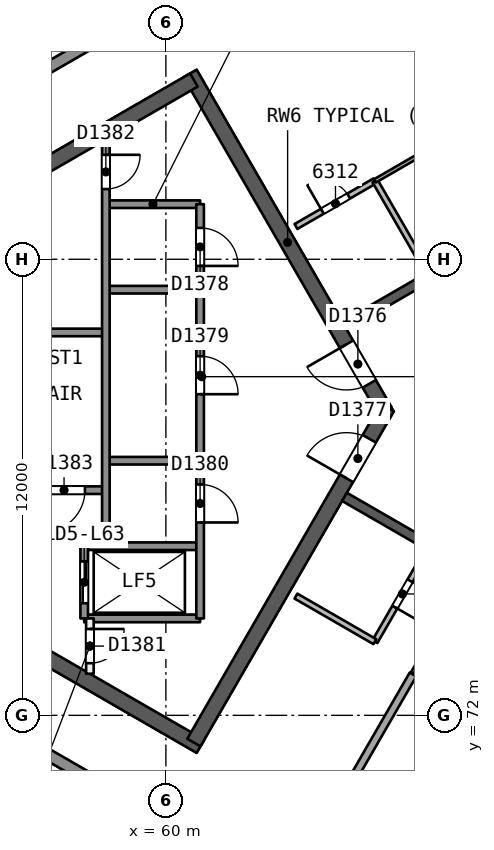
"""IFC4 building model, lengths in metres.
Left out: names, types, materials, properties, quantities, classifications, styles, units other than length and angle.
Written with IfcOpenShell. Run it as: python <this file> out.ifc"""

import sys

from ifc_helpers import new_model, si_unit, direction, frame, frame_2d, origin, place, context, subcontext, project, spatial, rectangle, extrude, element, fill, save


model = new_model("IFC4")
c1 = context("Model", 3, precision=1e-05, world=origin(), true_north=direction((0.0, 1.0)))
c2 = subcontext(c1, "Body", "Model", "MODEL_VIEW")
j1 = project(units=[si_unit("LENGTHUNIT", "METRE"), si_unit("PLANEANGLEUNIT", "RADIAN")], contexts=[c1])
p1 = place(None, origin())
s1 = spatial("IfcSite", under=j1, at=p1, CompositionType="ELEMENT")
p2 = place(p1, origin())
s2 = spatial("IfcBuilding", under=s1, at=p2, CompositionType="ELEMENT")
p3 = place(p2, frame((0.0, 0.0, 259.0)))
s3 = spatial("IfcBuildingStorey", under=s2, at=p3, CompositionType="ELEMENT", Elevation=259.0)
p4 = place(p3, frame((65.769, 80.0, 0.0), z_axis=(0.0, 0.0, 1.0), x_axis=(-0.50000177223, 0.866024380585, 0.0)))
e1 = element("IfcWall", 1, at=p4, inside=s3, PredefinedType="SHEAR", context=c2, shape_type="SweptSolid", body=[
    extrude(rectangle(XDim=10.265, YDim=0.4, at=frame_2d((5.132, 0.0))), origin(), (0.0, 0.0, 1.0), 3.7),
])
p5 = place(p4, frame((0.834, 0.0, 0.0)))
e2 = element("IfcOpeningElement", 2, at=p5, cuts=e1, PredefinedType="OPENING", context=c2, shape_type="SweptSolid", body=[
    extrude(rectangle(XDim=1.2, YDim=2.1, at=frame_2d((0.6, 1.05))), frame((0.0, 0.21, 0.0), z_axis=(0.0, -1.0, 0.0), x_axis=(1.0, 0.0, 0.0)), (0.0, 0.0, 1.0), 0.421),
])
p6 = place(p3, frame((60.737, 88.716, 0.0), z_axis=(0.0, 0.0, 1.0), x_axis=(-0.866028812667, -0.499994095595, 0.0)))
e3 = element("IfcWall", 3, at=p6, inside=s3, PredefinedType="SHEAR", context=c2, shape_type="SweptSolid", body=[
    extrude(rectangle(XDim=14.134, YDim=0.4, at=frame_2d((7.067, 0.0))), origin(), (0.0, 0.0, 1.0), 3.7),
])
p7 = place(p3, frame((48.597, 78.293, 0.0), z_axis=(0.0, 0.0, 1.0), x_axis=(0.866026024469, -0.499998924941, 0.0)))
e4 = element("IfcWall", 4, at=p7, inside=s3, PredefinedType="SHEAR", context=c2, shape_type="SweptSolid", body=[
    extrude(rectangle(XDim=14.218, YDim=0.4, at=frame_2d((7.109, 0.0))), origin(), (0.0, 0.0, 1.0), 3.7),
])
p8 = place(p3, frame((60.737, 71.284, 0.0), z_axis=(0.0, 0.0, 1.0), x_axis=(0.50000547566, 0.866022242388, 0.0)))
e5 = element("IfcWall", 5, at=p8, inside=s3, PredefinedType="SHEAR", context=c2, shape_type="SweptSolid", body=[
    extrude(rectangle(XDim=10.18, YDim=0.4, at=frame_2d((5.09, 0.0))), origin(), (0.0, 0.0, 1.0), 3.7),
])
p9 = place(p8, frame((8.03, 0.0, 0.0)))
e6 = element("IfcOpeningElement", 6, at=p9, cuts=e5, PredefinedType="OPENING", context=c2, shape_type="SweptSolid", body=[
    extrude(rectangle(XDim=1.2, YDim=2.1, at=frame_2d((0.6, 1.05))), frame((0.0, 0.21, 0.0), z_axis=(0.0, -1.0, 0.0), x_axis=(1.0, 0.0, 0.0)), (0.0, 0.0, 1.0), 0.421),
])
p10 = place(p3, frame((78.2, 90.046, 0.0), z_axis=(0.0, 0.0, 1.0), x_axis=(-0.866026492143, -0.499998114903, 0.0)))
e7 = element("IfcWall", 7, at=p10, inside=s3, PredefinedType="SHEAR", context=c2, shape_type="SweptSolid", body=[
    extrude(rectangle(XDim=15.588, YDim=0.25, at=frame_2d((7.794, 0.0))), origin(), (0.0, 0.0, 1.0), 3.3),
])
p11 = place(p10, frame((5.887, 0.0, 0.0)))
e8 = element("IfcOpeningElement", 8, at=p11, cuts=e7, PredefinedType="OPENING", context=c2, shape_type="SweptSolid", body=[
    extrude(rectangle(XDim=1.0, YDim=2.1, at=frame_2d((0.5, 1.05))), frame((0.0, 0.135, 0.0), z_axis=(0.0, -1.0, 0.0), x_axis=(1.0, 0.0, 0.0)), (0.0, 0.0, 1.0), 0.271),
])
p12 = place(p10, frame((9.481, 0.0, 0.0)))
e9 = element("IfcOpeningElement", 9, at=p12, cuts=e7, PredefinedType="OPENING", context=c2, shape_type="SweptSolid", body=[
    extrude(rectangle(XDim=1.0, YDim=2.1, at=frame_2d((0.5, 1.05))), frame((0.0, 0.135, 0.0), z_axis=(0.0, -1.0, 0.0), x_axis=(1.0, 0.0, 0.0)), (0.0, 0.0, 1.0), 0.271),
])
p13 = place(p3, frame((64.7, 77.748, 0.0), z_axis=(0.0, 0.0, 1.0), x_axis=(0.866026492143, -0.499998114903, 0.0)))
e10 = element("IfcWall", 10, at=p13, inside=s3, PredefinedType="SHEAR", context=c2, shape_type="SweptSolid", body=[
    extrude(rectangle(XDim=15.588, YDim=0.25, at=frame_2d((7.794, 0.0))), origin(), (0.0, 0.0, 1.0), 3.3),
])
p14 = place(p13, frame((2.747, 0.0, 0.0)))
e11 = element("IfcOpeningElement", 11, at=p14, cuts=e10, PredefinedType="OPENING", context=c2, shape_type="SweptSolid", body=[
    extrude(rectangle(XDim=1.0, YDim=2.1, at=frame_2d((0.5, 1.05))), frame((0.0, 0.135, 0.0), z_axis=(0.0, -1.0, 0.0), x_axis=(1.0, 0.0, 0.0)), (0.0, 0.0, 1.0), 0.271),
])
p15 = place(p13, frame((6.544, 0.0, 0.0)))
e12 = element("IfcOpeningElement", 12, at=p15, cuts=e10, PredefinedType="OPENING", context=c2, shape_type="SweptSolid", body=[
    extrude(rectangle(XDim=1.0, YDim=2.1, at=frame_2d((0.5, 1.05))), frame((0.0, 0.135, 0.0), z_axis=(0.0, -1.0, 0.0), x_axis=(1.0, 0.0, 0.0)), (0.0, 0.0, 1.0), 0.271),
])
p16 = place(p13, frame((10.441, 0.0, 0.0)))
e13 = element("IfcOpeningElement", 13, at=p16, cuts=e10, PredefinedType="OPENING", context=c2, shape_type="SweptSolid", body=[
    extrude(rectangle(XDim=1.0, YDim=2.1, at=frame_2d((0.5, 1.05))), frame((0.0, 0.135, 0.0), z_axis=(0.0, -1.0, 0.0), x_axis=(1.0, 0.0, 0.0)), (0.0, 0.0, 1.0), 0.271),
])
p17 = place(p13, frame((11.841, 0.0, 0.0)))
e14 = element("IfcOpeningElement", 14, at=p17, cuts=e10, PredefinedType="OPENING", context=c2, shape_type="SweptSolid", body=[
    extrude(rectangle(XDim=1.0, YDim=2.1, at=frame_2d((0.5, 1.05))), frame((0.0, 0.135, 0.0), z_axis=(0.0, -1.0, 0.0), x_axis=(1.0, 0.0, 0.0)), (0.0, 0.0, 1.0), 0.271),
])
p18 = place(p3, frame((65.961, 94.097, 0.0), z_axis=(0.0, 0.0, 1.0), x_axis=(0.499987326052, -0.866032720968, 0.0)))
e15 = element("IfcWall", 15, at=p18, inside=s3, PredefinedType="PARTITIONING", context=c2, shape_type="SweptSolid", body=[
    extrude(rectangle(XDim=9.628, YDim=0.2, at=frame_2d((4.814, 0.0))), origin(), (0.0, 0.0, 1.0), 3.3),
])
p19 = place(p3, frame((63.422, 84.863, 0.0), z_axis=(0.0, 0.0, 1.0), x_axis=(0.865994240961, 0.500053971709, 0.0)))
e16 = element("IfcWall", 16, at=p19, inside=s3, PredefinedType="PARTITIONING", context=c2, shape_type="SweptSolid", body=[
    extrude(rectangle(XDim=2.401, YDim=0.15, at=frame_2d((1.201, 0.0))), origin(), (0.0, 0.0, 1.0), 3.3),
])
p20 = place(p19, frame((0.801, 0.0, 0.0)))
e17 = element("IfcOpeningElement", 17, at=p20, cuts=e16, PredefinedType="OPENING", context=c2, shape_type="SweptSolid", body=[
    extrude(rectangle(XDim=0.8, YDim=2.1, at=frame_2d((0.4, 1.05))), frame((0.0, 0.085, 0.0), z_axis=(0.0, -1.0, 0.0), x_axis=(1.0, 0.0, 0.0)), (0.0, 0.0, 1.0), 0.171),
])
p21 = place(p3, frame((65.502, 86.063, 0.0), z_axis=(0.0, 0.0, 1.0), x_axis=(0.866055983265, 0.499947031044, 0.0)))
e18 = element("IfcWall", 18, at=p21, inside=s3, PredefinedType="PARTITIONING", context=c2, shape_type="SweptSolid", body=[
    extrude(rectangle(XDim=1.6, YDim=0.1, at=frame_2d((0.8, 0.0))), origin(), (0.0, 0.0, 1.0), 3.3),
])
p22 = place(p3, frame((66.952, 83.552, 0.0), z_axis=(0.0, 0.0, 1.0), x_axis=(-0.499987231761, 0.866032775405, 0.0)))
e19 = element("IfcWall", 19, at=p22, inside=s3, PredefinedType="PARTITIONING", context=c2, shape_type="SweptSolid", body=[
    extrude(rectangle(XDim=2.9, YDim=0.15, at=frame_2d((1.45, 0.0))), origin(), (0.0, 0.0, 1.0), 3.3),
])
p23 = place(p3, frame((66.949, 76.45, 0.0), z_axis=(0.0, 0.0, 1.0), x_axis=(-0.499987231761, -0.866032775405, 0.0)))
e20 = element("IfcWall", 20, at=p23, inside=s3, PredefinedType="PARTITIONING", context=c2, shape_type="SweptSolid", body=[
    extrude(rectangle(XDim=2.9, YDim=0.15, at=frame_2d((1.45, 0.0))), origin(), (0.0, 0.0, 1.0), 3.3),
])
p24 = place(p23, frame((1.05, 0.0, 0.0)))
e21 = element("IfcOpeningElement", 21, at=p24, cuts=e20, PredefinedType="OPENING", context=c2, shape_type="SweptSolid", body=[
    extrude(rectangle(XDim=0.8, YDim=2.1, at=frame_2d((0.4, 1.05))), frame((0.0, 0.085, 0.0), z_axis=(0.0, -1.0, 0.0), x_axis=(1.0, 0.0, 0.0)), (0.0, 0.0, 1.0), 0.171),
])
p25 = place(p3, frame((65.499, 73.938, 0.0), z_axis=(0.0, 0.0, 1.0), x_axis=(-0.866004188936, 0.500036743394, 0.0)))
e22 = element("IfcWall", 22, at=p25, inside=s3, PredefinedType="PARTITIONING", context=c2, shape_type="SweptSolid", body=[
    extrude(rectangle(XDim=2.398, YDim=0.15, at=frame_2d((1.199, 0.0))), origin(), (0.0, 0.0, 1.0), 3.3),
])
p26 = place(p3, frame((63.261, 67.462, 0.0), z_axis=(0.0, 0.0, 1.0), x_axis=(0.499983274767, 0.866035059887, 0.0)))
e23 = element("IfcWall", 23, at=p26, inside=s3, PredefinedType="PARTITIONING", context=c2, shape_type="SweptSolid", body=[
    extrude(rectangle(XDim=6.482, YDim=0.2, at=frame_2d((3.241, 0.0))), origin(), (0.0, 0.0, 1.0), 3.3),
])
p27 = place(p3, frame((66.502, 73.076, 0.0), z_axis=(0.0, 0.0, 1.0), x_axis=(0.499995674689, 0.86602790099, 0.0)))
e24 = element("IfcWall", 24, at=p27, inside=s3, PredefinedType="PARTITIONING", context=c2, shape_type="SweptSolid", body=[
    extrude(rectangle(XDim=3.146, YDim=0.15, at=frame_2d((1.573, 0.0))), origin(), (0.0, 0.0, 1.0), 3.3),
])
p28 = place(p3, frame((68.578, 71.877, 0.0), z_axis=(0.0, 0.0, 1.0), x_axis=(-0.866034636017, 0.499984008963, 0.0)))
e25 = element("IfcWall", 25, at=p28, inside=s3, PredefinedType="PARTITIONING", context=c2, shape_type="SweptSolid", body=[
    extrude(rectangle(XDim=2.397, YDim=0.15, at=frame_2d((1.198, 0.0))), origin(), (0.0, 0.0, 1.0), 3.3),
])
p29 = place(p3, frame((45.546, 82.482, 0.0), z_axis=(0.0, 0.0, 1.0), x_axis=(0.86602550179, 0.499999830249, 0.0)))
e26 = element("IfcWall", 26, at=p29, inside=s3, PredefinedType="SOLIDWALL", context=c2, shape_type="SweptSolid", body=[
    extrude(rectangle(XDim=48.533, YDim=0.3, at=frame_2d((24.267, 0.0))), origin(), (0.0, 0.0, 1.0), 3.3),
])
p30 = place(p29, frame((34.854, 0.0, 0.0)))
e27 = element("IfcOpeningElement", 27, at=p30, cuts=e26, PredefinedType="OPENING", context=c2, shape_type="SweptSolid", body=[
    extrude(rectangle(XDim=2.4, YDim=2.4, at=frame_2d((1.2, 1.2))), frame((0.0, 0.161, 0.0), z_axis=(0.0, -1.0, 0.0), x_axis=(1.0, 0.0, 0.0)), (0.0, 0.0, 1.0), 0.321),
])
p31 = place(p29, frame((10.5, 0.0, 0.0)))
e28 = element("IfcOpeningElement", 28, at=p31, cuts=e26, PredefinedType="OPENING", context=c2, shape_type="SweptSolid", body=[
    extrude(rectangle(XDim=2.4, YDim=2.4, at=frame_2d((1.2, 1.2))), frame((0.0, 0.161, 0.0), z_axis=(0.0, -1.0, 0.0), x_axis=(1.0, 0.0, 0.0)), (0.0, 0.0, 1.0), 0.321),
])
p32 = place(p3, frame((87.577, 53.251, 0.0), z_axis=(0.0, 0.0, 1.0), x_axis=(-0.86602550179, 0.499999830249, 0.0)))
e29 = element("IfcWall", 29, at=p32, inside=s3, PredefinedType="SOLIDWALL", context=c2, shape_type="SweptSolid", body=[
    extrude(rectangle(XDim=48.533, YDim=0.3, at=frame_2d((24.267, 0.0))), origin(), (0.0, 0.0, 1.0), 3.3),
])
p33 = place(p32, frame((37.192, 0.0, 0.0)))
e30 = element("IfcOpeningElement", 30, at=p33, cuts=e29, PredefinedType="OPENING", context=c2, shape_type="SweptSolid", body=[
    extrude(rectangle(XDim=2.4, YDim=2.4, at=frame_2d((1.2, 1.2))), frame((0.0, 0.161, 0.0), z_axis=(0.0, -1.0, 0.0), x_axis=(1.0, 0.0, 0.0)), (0.0, 0.0, 1.0), 0.321),
])
p34 = place(p32, frame((8.941, 0.0, 0.0)))
e31 = element("IfcOpeningElement", 31, at=p34, cuts=e29, PredefinedType="OPENING", context=c2, shape_type="SweptSolid", body=[
    extrude(rectangle(XDim=2.4, YDim=2.4, at=frame_2d((1.2, 1.2))), frame((0.0, 0.161, 0.0), z_axis=(0.0, -1.0, 0.0), x_axis=(1.0, 0.0, 0.0)), (0.0, 0.0, 1.0), 0.321),
])
p35 = place(p32, frame((25.015, 0.0, 0.0)))
e32 = element("IfcOpeningElement", 32, at=p35, cuts=e29, PredefinedType="OPENING", context=c2, shape_type="SweptSolid", body=[
    extrude(rectangle(XDim=2.4, YDim=2.4, at=frame_2d((1.2, 1.2))), frame((0.0, 0.161, 0.0), z_axis=(0.0, -1.0, 0.0), x_axis=(1.0, 0.0, 0.0)), (0.0, 0.0, 1.0), 0.321),
])
p36 = place(p32, frame((21.118, 0.0, 0.0)))
e33 = element("IfcOpeningElement", 33, at=p36, cuts=e29, PredefinedType="OPENING", context=c2, shape_type="SweptSolid", body=[
    extrude(rectangle(XDim=2.4, YDim=2.4, at=frame_2d((1.2, 1.2))), frame((0.0, 0.161, 0.0), z_axis=(0.0, -1.0, 0.0), x_axis=(1.0, 0.0, 0.0)), (0.0, 0.0, 1.0), 0.321),
])
for number, where, z_axis, x_axis in (
    (34, (60.9, 85.45, 0.0), (0.0, 0.0, 1.0), (-1.0, 0.0, 0.0)),
    (35, (60.9, 83.2, 0.0), (0.0, 0.0, 1.0), (-1.0, 0.0, 0.0)),
):
    element("IfcWall", number, at=place(p3, frame(where, z_axis=z_axis, x_axis=x_axis)), inside=s3, PredefinedType="SOLIDWALL", context=c2, shape_type="SweptSolid", body=[
        extrude(rectangle(XDim=2.48, YDim=0.2, at=frame_2d((1.24, 0.0))), origin(), (0.0, 0.0, 1.0), 3.3),
    ])
p37 = place(p3, frame((58.42, 82.075, 0.0), z_axis=(0.0, 0.0, 1.0), x_axis=(-1.0, 0.0, 0.0)))
e36 = element("IfcWall", 36, at=p37, inside=s3, PredefinedType="SOLIDWALL", context=c2, shape_type="SweptSolid", body=[
    extrude(rectangle(XDim=7.7, YDim=0.2, at=frame_2d((3.85, 0.0))), origin(), (0.0, 0.0, 1.0), 3.3),
])
p38 = place(p3, frame((60.9, 78.7, 0.0), z_axis=(0.0, 0.0, 1.0), x_axis=(-1.0, 0.0, 0.0)))
e37 = element("IfcWall", 37, at=p38, inside=s3, PredefinedType="SOLIDWALL", context=c2, shape_type="SweptSolid", body=[
    extrude(rectangle(XDim=2.48, YDim=0.2, at=frame_2d((1.24, 0.0))), origin(), (0.0, 0.0, 1.0), 3.3),
])
p39 = place(p3, frame((58.42, 77.925, 0.0), z_axis=(0.0, 0.0, 1.0), x_axis=(-1.0, 0.0, 0.0)))
e38 = element("IfcWall", 38, at=p39, inside=s3, PredefinedType="SOLIDWALL", context=c2, shape_type="SweptSolid", body=[
    extrude(rectangle(XDim=7.7, YDim=0.2, at=frame_2d((3.85, 0.0))), origin(), (0.0, 0.0, 1.0), 3.3),
])
p40 = place(p39, frame((0.55, 0.0, 0.0)))
e39 = element("IfcOpeningElement", 39, at=p40, cuts=e38, PredefinedType="OPENING", context=c2, shape_type="SweptSolid", body=[
    extrude(rectangle(XDim=1.1, YDim=2.1, at=frame_2d((0.55, 1.05))), frame((0.0, 0.11, 0.0), z_axis=(0.0, -1.0, 0.0), x_axis=(1.0, 0.0, 0.0)), (0.0, 0.0, 1.0), 0.221),
])
for number, where, z_axis, x_axis in (
    (40, (60.9, 76.45, 0.0), (0.0, 0.0, 1.0), (-1.0, 0.0, 0.0)),
    (41, (60.9, 74.55, 0.0), (0.0, 0.0, 1.0), (-1.0, 0.0, 0.0)),
):
    element("IfcWall", number, at=place(p3, frame(where, z_axis=z_axis, x_axis=x_axis)), inside=s3, PredefinedType="SOLIDWALL", context=c2, shape_type="SweptSolid", body=[
        extrude(rectangle(XDim=3.05, YDim=0.2, at=frame_2d((1.525, 0.0))), origin(), (0.0, 0.0, 1.0), 3.3),
    ])
p41 = place(p3, frame((60.9, 85.45, 0.0), z_axis=(0.0, 0.0, 1.0), x_axis=(0.0, -1.0, 0.0)))
e42 = element("IfcWall", 42, at=p41, inside=s3, PredefinedType="SOLIDWALL", context=c2, shape_type="SweptSolid", body=[
    extrude(rectangle(XDim=10.9, YDim=0.2, at=frame_2d((5.45, 0.0))), origin(), (0.0, 0.0, 1.0), 3.3),
])
p42 = place(p41, frame((0.625, 0.0, 0.0)))
e43 = element("IfcOpeningElement", 43, at=p42, cuts=e42, PredefinedType="OPENING", context=c2, shape_type="SweptSolid", body=[
    extrude(rectangle(XDim=1.0, YDim=2.1, at=frame_2d((0.5, 1.05))), frame((0.0, 0.11, 0.0), z_axis=(0.0, -1.0, 0.0), x_axis=(1.0, 0.0, 0.0)), (0.0, 0.0, 1.0), 0.221),
])
p43 = place(p41, frame((4.0, 0.0, 0.0)))
e44 = element("IfcOpeningElement", 44, at=p43, cuts=e42, PredefinedType="OPENING", context=c2, shape_type="SweptSolid", body=[
    extrude(rectangle(XDim=1.0, YDim=2.1, at=frame_2d((0.5, 1.05))), frame((0.0, 0.11, 0.0), z_axis=(0.0, -1.0, 0.0), x_axis=(1.0, 0.0, 0.0)), (0.0, 0.0, 1.0), 0.221),
])
p44 = place(p41, frame((7.375, 0.0, 0.0)))
e45 = element("IfcOpeningElement", 45, at=p44, cuts=e42, PredefinedType="OPENING", context=c2, shape_type="SweptSolid", body=[
    extrude(rectangle(XDim=1.0, YDim=2.1, at=frame_2d((0.5, 1.05))), frame((0.0, 0.11, 0.0), z_axis=(0.0, -1.0, 0.0), x_axis=(1.0, 0.0, 0.0)), (0.0, 0.0, 1.0), 0.221),
])
p45 = place(p3, frame((58.42, 87.148, 0.0), z_axis=(0.0, 0.0, 1.0), x_axis=(0.0, -1.0, 0.0)))
e46 = element("IfcWall", 46, at=p45, inside=s3, PredefinedType="SOLIDWALL", context=c2, shape_type="SweptSolid", body=[
    extrude(rectangle(XDim=10.698, YDim=0.2, at=frame_2d((5.349, 0.0))), origin(), (0.0, 0.0, 1.0), 3.3),
])
p46 = place(p45, frame((0.399, 0.0, 0.0)))
e47 = element("IfcOpeningElement", 47, at=p46, cuts=e46, PredefinedType="OPENING", context=c2, shape_type="SweptSolid", body=[
    extrude(rectangle(XDim=0.9, YDim=2.1, at=frame_2d((0.45, 1.05))), frame((0.0, 0.11, 0.0), z_axis=(0.0, -1.0, 0.0), x_axis=(1.0, 0.0, 0.0)), (0.0, 0.0, 1.0), 0.221),
])
p47 = place(p3, frame((58.0, 74.55, 0.0), z_axis=(0.0, 0.0, 1.0), x_axis=(0.0, -1.0, 0.0)))
e48 = element("IfcWall", 48, at=p47, inside=s3, PredefinedType="PARTITIONING", context=c2, shape_type="SweptSolid", body=[
    extrude(rectangle(XDim=1.455, YDim=0.2, at=frame_2d((0.728, 0.0))), origin(), (0.0, 0.0, 1.0), 3.3),
])
p48 = place(p47, frame((0.278, 0.0, 0.0)))
e49 = element("IfcOpeningElement", 49, at=p48, cuts=e48, PredefinedType="OPENING", context=c2, shape_type="SweptSolid", body=[
    extrude(rectangle(XDim=0.9, YDim=2.1, at=frame_2d((0.45, 1.05))), frame((0.0, 0.11, 0.0), z_axis=(0.0, -1.0, 0.0), x_axis=(1.0, 0.0, 0.0)), (0.0, 0.0, 1.0), 0.221),
])
p49 = place(p3, frame((57.85, 76.45, 0.0), z_axis=(0.0, 0.0, 1.0), x_axis=(0.0, -1.0, 0.0)))
e50 = element("IfcWall", 50, at=p49, inside=s3, PredefinedType="SOLIDWALL", context=c2, shape_type="SweptSolid", body=[
    extrude(rectangle(XDim=1.9, YDim=0.2, at=frame_2d((0.95, 0.0))), origin(), (0.0, 0.0, 1.0), 3.3),
])
p50 = place(p49, frame((0.4, 0.0, 0.0)))
e51 = element("IfcOpeningElement", 51, at=p50, cuts=e50, PredefinedType="OPENING", context=c2, shape_type="SweptSolid", body=[
    extrude(rectangle(XDim=1.1, YDim=2.1, at=frame_2d((0.55, 1.05))), frame((0.0, 0.11, 0.0), z_axis=(0.0, -1.0, 0.0), x_axis=(1.0, 0.0, 0.0)), (0.0, 0.0, 1.0), 0.221),
])
p51 = place(p20, origin())
e52 = element("IfcDoor", 52, at=p51, inside=s3, OperationType="SINGLE_SWING_LEFT", PredefinedType="NOTDEFINED", context=c2, shape_type="SweptSolid", body=[
    extrude(rectangle(XDim=0.8, YDim=2.1, at=frame_2d((0.4, 1.05))), frame((0.0, 0.025, 0.0), z_axis=(0.0, -1.0, 0.0), x_axis=(1.0, 0.0, 0.0)), (0.0, 0.0, 1.0), 0.05),
])
fill(e17, e52)
p52 = place(p24, origin())
e53 = element("IfcDoor", 53, at=p52, inside=s3, OperationType="SINGLE_SWING_RIGHT", PredefinedType="NOTDEFINED", context=c2, shape_type="SweptSolid", body=[
    extrude(rectangle(XDim=0.8, YDim=2.1, at=frame_2d((0.4, 1.05))), frame((0.0, 0.025, 0.0), z_axis=(0.0, -1.0, 0.0), x_axis=(1.0, 0.0, 0.0)), (0.0, 0.0, 1.0), 0.05),
])
fill(e21, e53)
p53 = place(p5, origin())
e54 = element("IfcDoor", 54, at=p53, inside=s3, OperationType="SINGLE_SWING_RIGHT", PredefinedType="NOTDEFINED", context=c2, shape_type="SweptSolid", body=[
    extrude(rectangle(XDim=1.2, YDim=2.1, at=frame_2d((0.6, 1.05))), frame((0.0, 0.025, 0.0), z_axis=(0.0, -1.0, 0.0), x_axis=(1.0, 0.0, 0.0)), (0.0, 0.0, 1.0), 0.05),
])
fill(e2, e54)
p54 = place(p9, origin())
e55 = element("IfcDoor", 55, at=p54, inside=s3, OperationType="SINGLE_SWING_LEFT", PredefinedType="NOTDEFINED", context=c2, shape_type="SweptSolid", body=[
    extrude(rectangle(XDim=1.2, YDim=2.1, at=frame_2d((0.6, 1.05))), frame((0.0, 0.025, 0.0), z_axis=(0.0, -1.0, 0.0), x_axis=(1.0, 0.0, 0.0)), (0.0, 0.0, 1.0), 0.05),
])
fill(e6, e55)
p55 = place(p50, origin())
e56 = element("IfcDoor", 56, at=p55, inside=s3, OperationType="SLIDING_TO_RIGHT", PredefinedType="NOTDEFINED", context=c2, shape_type="SweptSolid", body=[
    extrude(rectangle(XDim=1.1, YDim=2.1, at=frame_2d((0.55, 1.05))), frame((0.0, 0.025, 0.0), z_axis=(0.0, -1.0, 0.0), x_axis=(1.0, 0.0, 0.0)), (0.0, 0.0, 1.0), 0.05),
])
fill(e51, e56)
p56 = place(p42, origin())
e57 = element("IfcDoor", 57, at=p56, inside=s3, OperationType="SINGLE_SWING_RIGHT", PredefinedType="NOTDEFINED", context=c2, shape_type="SweptSolid", body=[
    extrude(rectangle(XDim=1.0, YDim=2.1, at=frame_2d((0.5, 1.05))), frame((0.0, 0.025, 0.0), z_axis=(0.0, -1.0, 0.0), x_axis=(1.0, 0.0, 0.0)), (0.0, 0.0, 1.0), 0.05),
])
fill(e43, e57)
p57 = place(p43, origin())
e58 = element("IfcDoor", 58, at=p57, inside=s3, OperationType="SINGLE_SWING_RIGHT", PredefinedType="NOTDEFINED", context=c2, shape_type="SweptSolid", body=[
    extrude(rectangle(XDim=1.0, YDim=2.1, at=frame_2d((0.5, 1.05))), frame((0.0, 0.025, 0.0), z_axis=(0.0, -1.0, 0.0), x_axis=(1.0, 0.0, 0.0)), (0.0, 0.0, 1.0), 0.05),
])
fill(e44, e58)
p58 = place(p44, origin())
e59 = element("IfcDoor", 59, at=p58, inside=s3, OperationType="SINGLE_SWING_RIGHT", PredefinedType="NOTDEFINED", context=c2, shape_type="SweptSolid", body=[
    extrude(rectangle(XDim=1.0, YDim=2.1, at=frame_2d((0.5, 1.05))), frame((0.0, 0.025, 0.0), z_axis=(0.0, -1.0, 0.0), x_axis=(1.0, 0.0, 0.0)), (0.0, 0.0, 1.0), 0.05),
])
fill(e45, e59)
p59 = place(p48, origin())
e60 = element("IfcDoor", 60, at=p59, inside=s3, OperationType="SINGLE_SWING_LEFT", PredefinedType="NOTDEFINED", context=c2, shape_type="SweptSolid", body=[
    extrude(rectangle(XDim=0.9, YDim=2.1, at=frame_2d((0.45, 1.05))), frame((0.0, 0.025, 0.0), z_axis=(0.0, -1.0, 0.0), x_axis=(1.0, 0.0, 0.0)), (0.0, 0.0, 1.0), 0.05),
])
fill(e49, e60)
p60 = place(p46, origin())
e61 = element("IfcDoor", 61, at=p60, inside=s3, OperationType="SINGLE_SWING_LEFT", PredefinedType="NOTDEFINED", context=c2, shape_type="SweptSolid", body=[
    extrude(rectangle(XDim=0.9, YDim=2.1, at=frame_2d((0.45, 1.05))), frame((0.0, 0.025, 0.0), z_axis=(0.0, -1.0, 0.0), x_axis=(1.0, 0.0, 0.0)), (0.0, 0.0, 1.0), 0.05),
])
fill(e47, e61)
p61 = place(p40, origin())
e62 = element("IfcDoor", 62, at=p61, inside=s3, OperationType="SINGLE_SWING_RIGHT", PredefinedType="NOTDEFINED", context=c2, shape_type="SweptSolid", body=[
    extrude(rectangle(XDim=1.1, YDim=2.1, at=frame_2d((0.55, 1.05))), frame((0.0, 0.025, 0.0), z_axis=(0.0, -1.0, 0.0), x_axis=(1.0, 0.0, 0.0)), (0.0, 0.0, 1.0), 0.05),
])
fill(e39, e62)
save(model, sys.argv[1])
